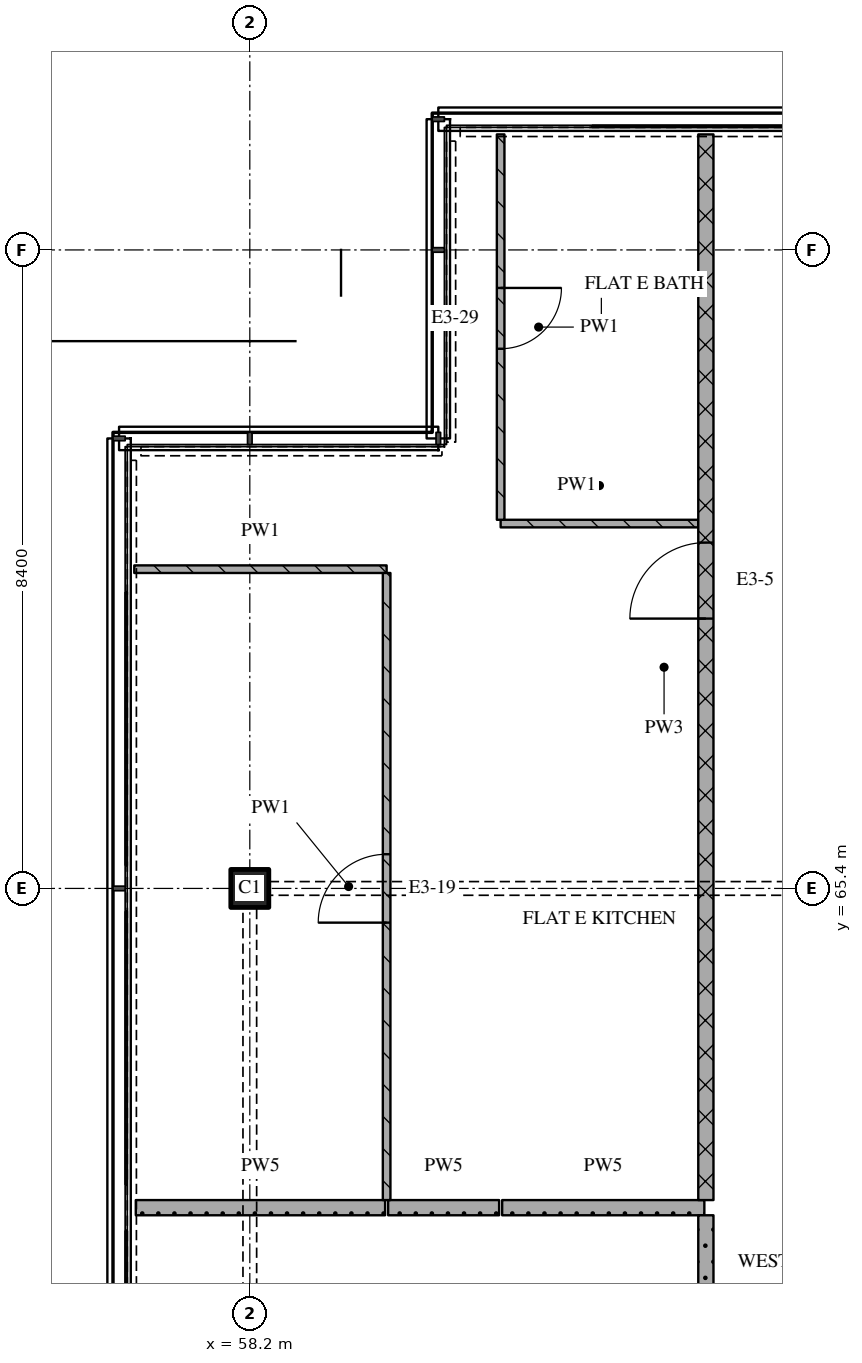
"""IFC4 building model, lengths in metres.
Left out: names, types, materials, properties, quantities, classifications, styles, units other than length and angle.
Written with IfcOpenShell. Run it as: python <this file> out.ifc"""

import sys

from ifc_helpers import new_model, si_unit, direction, frame, frame_2d, origin, origin_2d, place, context, subcontext, project, spatial, rectangle, extrude, element, fill, save


model = new_model("IFC4")
c1 = context("Model", 3, precision=1e-05, world=origin(), true_north=direction((0.0, 1.0)))
c2 = subcontext(c1, "Body", "Model", "MODEL_VIEW")
j1 = project(units=[si_unit("LENGTHUNIT", "METRE"), si_unit("PLANEANGLEUNIT", "RADIAN")], contexts=[c1])
p1 = place(None, origin())
s1 = spatial("IfcSite", under=j1, at=p1, CompositionType="ELEMENT")
p2 = place(p1, origin())
s2 = spatial("IfcBuilding", under=s1, at=p2, CompositionType="ELEMENT")
p3 = place(p2, frame((0.0, 0.0, 274.35)))
s3 = spatial("IfcBuildingStorey", under=s2, at=p3, CompositionType="ELEMENT", Elevation=274.35)
p4 = place(p3, frame((58.2, 65.4, 0.0), z_axis=(0.0, 0.0, 1.0), x_axis=(1.0, 0.0, 0.0)))
e1 = element("IfcColumn", 1, at=p4, inside=s3, PredefinedType="COLUMN", context=c2, shape_type="SweptSolid", body=[
    extrude(rectangle(XDim=0.5, YDim=0.5, at=origin_2d()), origin(), (0.0, 0.0, 1.0), 3.6),
])
p5 = place(p3, frame((56.7, 61.2, 0.0), z_axis=(0.0, 0.0, 1.0), x_axis=(1.0, 0.0, 0.0)))
e2 = element("IfcWall", 2, at=p5, inside=s3, PredefinedType="PARTITIONING", context=c2, shape_type="SweptSolid", body=[
    extrude(rectangle(XDim=3.28, YDim=0.2, at=frame_2d((1.64, 0.0))), origin(), (0.0, 0.0, 1.0), 3.32),
])
p6 = place(p3, frame((60.02, 61.2, 0.0), z_axis=(0.0, 0.0, 1.0), x_axis=(1.0, 0.0, 0.0)))
e3 = element("IfcWall", 3, at=p6, inside=s3, PredefinedType="PARTITIONING", context=c2, shape_type="SweptSolid", body=[
    extrude(rectangle(XDim=1.46, YDim=0.2, at=frame_2d((0.73, 0.0))), origin(), (0.0, 0.0, 1.0), 3.32),
])
p7 = place(p3, frame((61.52, 61.2, 0.0), z_axis=(0.0, 0.0, 1.0), x_axis=(1.0, 0.0, 0.0)))
e4 = element("IfcWall", 4, at=p7, inside=s3, PredefinedType="PARTITIONING", context=c2, shape_type="SweptSolid", body=[
    extrude(rectangle(XDim=2.66, YDim=0.2, at=frame_2d((1.33, 0.0))), origin(), (0.0, 0.0, 1.0), 3.32),
])
p8 = place(p3, frame((56.68, 69.6, 0.0), z_axis=(0.0, 0.0, 1.0), x_axis=(1.0, 0.0, 0.0)))
e5 = element("IfcWall", 5, at=p8, inside=s3, PredefinedType="PARTITIONING", context=c2, shape_type="SweptSolid", body=[
    extrude(rectangle(XDim=3.32, YDim=0.1, at=frame_2d((1.66, 0.0))), origin(), (0.0, 0.0, 1.0), 3.32),
])
p9 = place(p3, frame((61.5, 70.2, 0.0), z_axis=(0.0, 0.0, 1.0), x_axis=(1.0, 0.0, 0.0)))
e6 = element("IfcWall", 6, at=p9, inside=s3, PredefinedType="PARTITIONING", context=c2, shape_type="SweptSolid", body=[
    extrude(rectangle(XDim=2.6, YDim=0.1, at=frame_2d((1.3, 0.0))), origin(), (0.0, 0.0, 1.0), 3.32),
])
p10 = place(p3, frame((60.0, 61.3, 0.0), z_axis=(0.0, 0.0, 1.0), x_axis=(0.0, 1.0, 0.0)))
e7 = element("IfcWall", 7, at=p10, inside=s3, PredefinedType="PARTITIONING", context=c2, shape_type="SweptSolid", body=[
    extrude(rectangle(XDim=8.25, YDim=0.1, at=frame_2d((4.125, 0.0))), origin(), (0.0, 0.0, 1.0), 3.32),
])
p11 = place(p10, frame((3.65, 0.0, 0.0)))
e8 = element("IfcOpeningElement", 8, at=p11, cuts=e7, PredefinedType="OPENING", context=c2, shape_type="SweptSolid", body=[
    extrude(rectangle(XDim=0.9, YDim=2.1, at=frame_2d((0.45, 1.05))), frame((0.0, 0.06, 0.0), z_axis=(0.0, -1.0, 0.0), x_axis=(1.0, 0.0, 0.0)), (0.0, 0.0, 1.0), 0.12),
])
p12 = place(p3, frame((61.5, 75.32, 0.0), z_axis=(0.0, 0.0, 1.0), x_axis=(0.0, -1.0, 0.0)))
e9 = element("IfcWall", 9, at=p12, inside=s3, PredefinedType="PARTITIONING", context=c2, shape_type="SweptSolid", body=[
    extrude(rectangle(XDim=5.07, YDim=0.1, at=frame_2d((2.535, 0.0))), origin(), (0.0, 0.0, 1.0), 3.32),
])
p13 = place(p12, frame((2.02, 0.0, 0.0)))
e10 = element("IfcOpeningElement", 10, at=p13, cuts=e9, PredefinedType="OPENING", context=c2, shape_type="SweptSolid", body=[
    extrude(rectangle(XDim=0.8, YDim=2.1, at=frame_2d((0.4, 1.05))), frame((0.0, 0.06, 0.0), z_axis=(0.0, -1.0, 0.0), x_axis=(1.0, 0.0, 0.0)), (0.0, 0.0, 1.0), 0.12),
])
p14 = place(p3, frame((64.2, 61.3, 0.0), z_axis=(0.0, 0.0, 1.0), x_axis=(0.0, 1.0, 0.0)))
e11 = element("IfcWall", 11, at=p14, inside=s3, PredefinedType="PARTITIONING", context=c2, shape_type="SweptSolid", body=[
    extrude(rectangle(XDim=14.02, YDim=0.2, at=frame_2d((7.01, 0.0))), origin(), (0.0, 0.0, 1.0), 3.32),
])
p15 = place(p14, frame((7.65, 0.0, 0.0)))
e12 = element("IfcOpeningElement", 12, at=p15, cuts=e11, PredefinedType="OPENING", context=c2, shape_type="SweptSolid", body=[
    extrude(rectangle(XDim=1.0, YDim=2.1, at=frame_2d((0.5, 1.05))), frame((0.0, 0.11, 0.0), z_axis=(0.0, -1.0, 0.0), x_axis=(1.0, 0.0, 0.0)), (0.0, 0.0, 1.0), 0.22),
])
p16 = place(p3, frame((64.2, 61.1, 0.0), z_axis=(0.0, 0.0, 1.0), x_axis=(0.0, -1.0, 0.0)))
e13 = element("IfcWall", 13, at=p16, inside=s3, PredefinedType="PARTITIONING", context=c2, shape_type="SweptSolid", body=[
    extrude(rectangle(XDim=2.2, YDim=0.2, at=frame_2d((1.1, 0.0))), origin(), (0.0, 0.0, 1.0), 3.32),
])
p17 = place(p11, origin())
e14 = element("IfcDoor", 14, at=p17, inside=s3, OperationType="SINGLE_SWING_LEFT", PredefinedType="DOOR", context=c2, shape_type="SweptSolid", body=[
    extrude(rectangle(XDim=0.9, YDim=2.1, at=frame_2d((0.45, 1.05))), frame((0.0, 0.025, 0.0), z_axis=(0.0, -1.0, 0.0), x_axis=(1.0, 0.0, 0.0)), (0.0, 0.0, 1.0), 0.05),
])
fill(e8, e14)
p18 = place(p13, origin())
e15 = element("IfcDoor", 15, at=p18, inside=s3, OperationType="SINGLE_SWING_LEFT", PredefinedType="DOOR", context=c2, shape_type="SweptSolid", body=[
    extrude(rectangle(XDim=0.8, YDim=2.1, at=frame_2d((0.4, 1.05))), frame((0.0, 0.025, 0.0), z_axis=(0.0, -1.0, 0.0), x_axis=(1.0, 0.0, 0.0)), (0.0, 0.0, 1.0), 0.05),
])
fill(e10, e15)
p19 = place(p15, origin())
e16 = element("IfcDoor", 16, at=p19, inside=s3, OperationType="SINGLE_SWING_LEFT", PredefinedType="DOOR", context=c2, shape_type="SweptSolid", body=[
    extrude(rectangle(XDim=1.0, YDim=2.1, at=frame_2d((0.5, 1.05))), frame((0.0, 0.025, 0.0), z_axis=(0.0, -1.0, 0.0), x_axis=(1.0, 0.0, 0.0)), (0.0, 0.0, 1.0), 0.05),
])
fill(e12, e16)
save(model, sys.argv[1])
